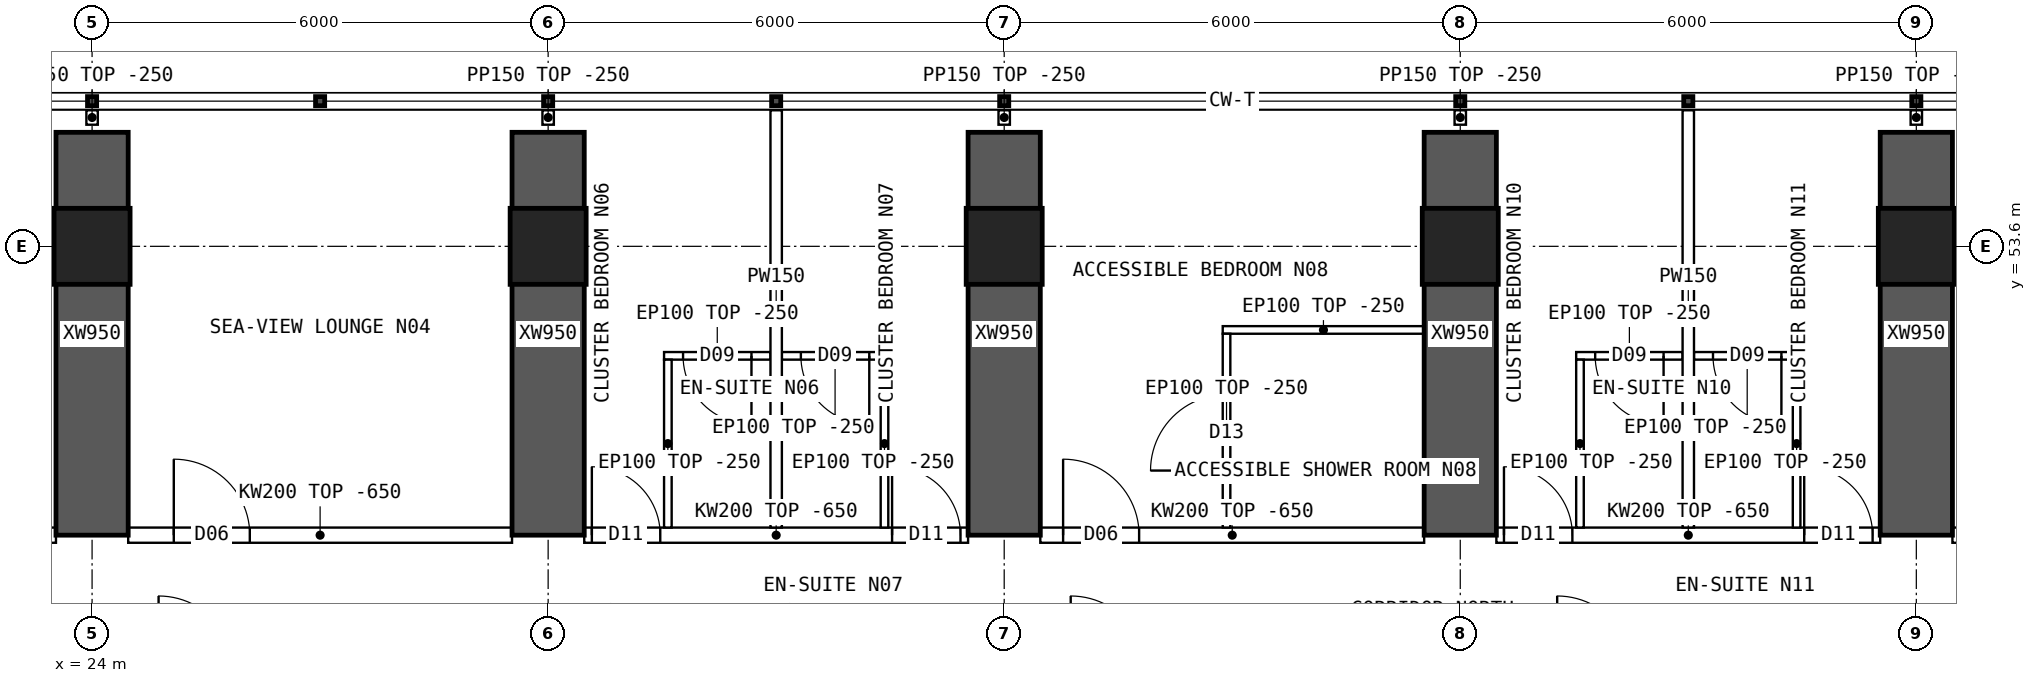
"""IFC4 building model, lengths in metres.
Left out: names, types, materials, properties, quantities, classifications, styles, units other than length and angle.
Written with IfcOpenShell. Run it as: python <this file> out.ifc"""

import sys

from ifc_helpers import new_model, si_unit, direction, frame, frame_2d, origin, origin_2d, place, context, subcontext, project, spatial, polyline, rectangle, hollow_rectangle, outline, extrude, element, fill, save


model = new_model("IFC4")
c1 = context("Model", 3, precision=1e-05, world=origin(), true_north=direction((0.0, 1.0)))
c2 = subcontext(c1, "Body", "Model", "MODEL_VIEW")
j1 = project(units=[si_unit("LENGTHUNIT", "METRE"), si_unit("PLANEANGLEUNIT", "RADIAN")], contexts=[c1])
p1 = place(None, origin())
s1 = spatial("IfcSite", under=j1, at=p1, CompositionType="ELEMENT")
p2 = place(p1, origin())
s2 = spatial("IfcBuilding", under=s1, at=p2, CompositionType="ELEMENT")
p3 = place(p2, frame((0.0, 0.0, 91.9)))
s3 = spatial("IfcBuildingStorey", under=s2, at=p3, CompositionType="ELEMENT", Elevation=91.9)
for number, where, z_axis, x_axis in (
    (1, (24.0, 53.6, 0.0), (0.0, 0.0, 1.0), (1.0, 0.0, 0.0)),
    (2, (30.0, 53.6, 0.0), (0.0, 0.0, 1.0), (1.0, 0.0, 0.0)),
    (3, (36.0, 53.6, 0.0), (0.0, 0.0, 1.0), (1.0, 0.0, 0.0)),
    (4, (42.0, 53.6, 0.0), (0.0, 0.0, 1.0), (1.0, 0.0, 0.0)),
    (5, (48.0, 53.6, 0.0), (0.0, 0.0, 1.0), (1.0, 0.0, 0.0)),
):
    element("IfcColumn", number, at=place(p3, frame(where, z_axis=z_axis, x_axis=x_axis)), inside=s3, PredefinedType="COLUMN", context=c2, shape_type="SweptSolid", body=[
        extrude(hollow_rectangle(XDim=1.0, YDim=1.0, WallThickness=0.1, at=origin_2d()), origin(), (0.0, 0.0, 1.0), 3.75),
    ])
for number, where, z_axis, x_axis in (
    (6, (24.0, 49.8, 0.0), (0.0, 0.0, 1.0), (0.0, 1.0, 0.0)),
    (7, (30.0, 49.8, 0.0), (0.0, 0.0, 1.0), (0.0, 1.0, 0.0)),
    (8, (36.0, 49.8, 0.0), (0.0, 0.0, 1.0), (0.0, 1.0, 0.0)),
    (9, (42.0, 49.8, 0.0), (0.0, 0.0, 1.0), (0.0, 1.0, 0.0)),
    (10, (48.0, 49.8, 0.0), (0.0, 0.0, 1.0), (0.0, 1.0, 0.0)),
):
    element("IfcWall", number, at=place(p3, frame(where, z_axis=z_axis, x_axis=x_axis)), inside=s3, PredefinedType="SHEAR", context=c2, shape_type="SweptSolid", body=[
        extrude(rectangle(XDim=5.3, YDim=0.95, at=frame_2d((2.65, 0.0))), origin(), (0.0, 0.0, 1.0), 3.75),
    ])
p4 = place(p3, frame((18.475, 49.8, 0.0), z_axis=(0.0, 0.0, 1.0), x_axis=(1.0, 0.0, 0.0)))
e11 = element("IfcWall", 11, at=p4, inside=s3, PredefinedType="SOLIDWALL", context=c2, shape_type="SweptSolid", body=[
    extrude(outline(polyline([(0.0, 0.0), (5.05, 0.0), (5.05, 3.1), (0.0, 3.1), (0.0, 0.0)])), frame((0.0, 0.1, 0.0), z_axis=(0.0, -1.0, 0.0), x_axis=(1.0, 0.0, 0.0)), (0.0, 0.0, 1.0), 0.2),
])
p5 = place(p4, frame((0.1, 0.0, 0.0)))
e12 = element("IfcOpeningElement", 12, at=p5, cuts=e11, PredefinedType="OPENING", context=c2, shape_type="SweptSolid", body=[
    extrude(rectangle(XDim=0.9, YDim=2.1, at=frame_2d((0.45, 1.05))), frame((0.0, 0.11, 0.0), z_axis=(0.0, -1.0, 0.0), x_axis=(1.0, 0.0, 0.0)), (0.0, 0.0, 1.0), 0.22),
])
p6 = place(p4, frame((4.05, 0.0, 0.0)))
e13 = element("IfcOpeningElement", 13, at=p6, cuts=e11, PredefinedType="OPENING", context=c2, shape_type="SweptSolid", body=[
    extrude(rectangle(XDim=0.9, YDim=2.1, at=frame_2d((0.45, 1.05))), frame((0.0, 0.11, 0.0), z_axis=(0.0, -1.0, 0.0), x_axis=(1.0, 0.0, 0.0)), (0.0, 0.0, 1.0), 0.22),
])
p7 = place(p3, frame((24.475, 49.8, 0.0), z_axis=(0.0, 0.0, 1.0), x_axis=(1.0, 0.0, 0.0)))
e14 = element("IfcWall", 14, at=p7, inside=s3, PredefinedType="SOLIDWALL", context=c2, shape_type="SweptSolid", body=[
    extrude(outline(polyline([(0.0, 0.0), (5.05, 0.0), (5.05, 3.1), (0.0, 3.1), (0.0, 0.0)])), frame((0.0, 0.1, 0.0), z_axis=(0.0, -1.0, 0.0), x_axis=(1.0, 0.0, 0.0)), (0.0, 0.0, 1.0), 0.2),
])
p8 = place(p7, frame((0.6, 0.0, 0.0)))
e15 = element("IfcOpeningElement", 15, at=p8, cuts=e14, PredefinedType="OPENING", context=c2, shape_type="SweptSolid", body=[
    extrude(rectangle(XDim=1.0, YDim=2.1, at=frame_2d((0.5, 1.05))), frame((0.0, 0.11, 0.0), z_axis=(0.0, -1.0, 0.0), x_axis=(1.0, 0.0, 0.0)), (0.0, 0.0, 1.0), 0.22),
])
p9 = place(p3, frame((30.475, 49.8, 0.0), z_axis=(0.0, 0.0, 1.0), x_axis=(1.0, 0.0, 0.0)))
e16 = element("IfcWall", 16, at=p9, inside=s3, PredefinedType="SOLIDWALL", context=c2, shape_type="SweptSolid", body=[
    extrude(outline(polyline([(0.0, 0.0), (5.05, 0.0), (5.05, 3.1), (0.0, 3.1), (0.0, 0.0)])), frame((0.0, 0.1, 0.0), z_axis=(0.0, -1.0, 0.0), x_axis=(1.0, 0.0, 0.0)), (0.0, 0.0, 1.0), 0.2),
])
p10 = place(p9, frame((0.1, 0.0, 0.0)))
e17 = element("IfcOpeningElement", 17, at=p10, cuts=e16, PredefinedType="OPENING", context=c2, shape_type="SweptSolid", body=[
    extrude(rectangle(XDim=0.9, YDim=2.1, at=frame_2d((0.45, 1.05))), frame((0.0, 0.11, 0.0), z_axis=(0.0, -1.0, 0.0), x_axis=(1.0, 0.0, 0.0)), (0.0, 0.0, 1.0), 0.22),
])
p11 = place(p9, frame((4.05, 0.0, 0.0)))
e18 = element("IfcOpeningElement", 18, at=p11, cuts=e16, PredefinedType="OPENING", context=c2, shape_type="SweptSolid", body=[
    extrude(rectangle(XDim=0.9, YDim=2.1, at=frame_2d((0.45, 1.05))), frame((0.0, 0.11, 0.0), z_axis=(0.0, -1.0, 0.0), x_axis=(1.0, 0.0, 0.0)), (0.0, 0.0, 1.0), 0.22),
])
p12 = place(p3, frame((36.475, 49.8, 0.0), z_axis=(0.0, 0.0, 1.0), x_axis=(1.0, 0.0, 0.0)))
e19 = element("IfcWall", 19, at=p12, inside=s3, PredefinedType="SOLIDWALL", context=c2, shape_type="SweptSolid", body=[
    extrude(outline(polyline([(0.0, 0.0), (5.05, 0.0), (5.05, 3.1), (0.0, 3.1), (0.0, 0.0)])), frame((0.0, 0.1, 0.0), z_axis=(0.0, -1.0, 0.0), x_axis=(1.0, 0.0, 0.0)), (0.0, 0.0, 1.0), 0.2),
])
p13 = place(p12, frame((0.3, 0.0, 0.0)))
e20 = element("IfcOpeningElement", 20, at=p13, cuts=e19, PredefinedType="OPENING", context=c2, shape_type="SweptSolid", body=[
    extrude(rectangle(XDim=1.0, YDim=2.1, at=frame_2d((0.5, 1.05))), frame((0.0, 0.11, 0.0), z_axis=(0.0, -1.0, 0.0), x_axis=(1.0, 0.0, 0.0)), (0.0, 0.0, 1.0), 0.22),
])
p14 = place(p3, frame((42.475, 49.8, 0.0), z_axis=(0.0, 0.0, 1.0), x_axis=(1.0, 0.0, 0.0)))
e21 = element("IfcWall", 21, at=p14, inside=s3, PredefinedType="SOLIDWALL", context=c2, shape_type="SweptSolid", body=[
    extrude(outline(polyline([(0.0, 0.0), (5.05, 0.0), (5.05, 3.1), (0.0, 3.1), (0.0, 0.0)])), frame((0.0, 0.1, 0.0), z_axis=(0.0, -1.0, 0.0), x_axis=(1.0, 0.0, 0.0)), (0.0, 0.0, 1.0), 0.2),
])
p15 = place(p14, frame((0.1, 0.0, 0.0)))
e22 = element("IfcOpeningElement", 22, at=p15, cuts=e21, PredefinedType="OPENING", context=c2, shape_type="SweptSolid", body=[
    extrude(rectangle(XDim=0.9, YDim=2.1, at=frame_2d((0.45, 1.05))), frame((0.0, 0.11, 0.0), z_axis=(0.0, -1.0, 0.0), x_axis=(1.0, 0.0, 0.0)), (0.0, 0.0, 1.0), 0.22),
])
p16 = place(p14, frame((4.05, 0.0, 0.0)))
e23 = element("IfcOpeningElement", 23, at=p16, cuts=e21, PredefinedType="OPENING", context=c2, shape_type="SweptSolid", body=[
    extrude(rectangle(XDim=0.9, YDim=2.1, at=frame_2d((0.45, 1.05))), frame((0.0, 0.11, 0.0), z_axis=(0.0, -1.0, 0.0), x_axis=(1.0, 0.0, 0.0)), (0.0, 0.0, 1.0), 0.22),
])
p17 = place(p3, frame((48.475, 49.8, 0.0), z_axis=(0.0, 0.0, 1.0), x_axis=(1.0, 0.0, 0.0)))
e24 = element("IfcWall", 24, at=p17, inside=s3, PredefinedType="SOLIDWALL", context=c2, shape_type="SweptSolid", body=[
    extrude(outline(polyline([(0.0, 0.0), (5.05, 0.0), (5.05, 3.1), (0.0, 3.1), (0.0, 0.0)])), frame((0.0, 0.1, 0.0), z_axis=(0.0, -1.0, 0.0), x_axis=(1.0, 0.0, 0.0)), (0.0, 0.0, 1.0), 0.2),
])
p18 = place(p17, frame((0.6, 0.0, 0.0)))
e25 = element("IfcOpeningElement", 25, at=p18, cuts=e24, PredefinedType="OPENING", context=c2, shape_type="SweptSolid", body=[
    extrude(rectangle(XDim=1.0, YDim=2.1, at=frame_2d((0.5, 1.05))), frame((0.0, 0.11, 0.0), z_axis=(0.0, -1.0, 0.0), x_axis=(1.0, 0.0, 0.0)), (0.0, 0.0, 1.0), 0.22),
])
p19 = place(p3, frame((33.0, 55.39, 0.0), z_axis=(0.0, 0.0, 1.0), x_axis=(0.0, -1.0, 0.0)))
e26 = element("IfcWall", 26, at=p19, inside=s3, PredefinedType="PARTITIONING", context=c2, shape_type="SweptSolid", body=[
    extrude(outline(polyline([(0.0, 0.0), (5.49, 0.0), (5.49, 3.1), (5.442, 3.1), (5.44, 3.5), (1.992, 3.5), (1.99, 3.1), (1.592, 3.1), (1.59, 3.5), (0.0, 3.5), (0.0, 0.0)])), frame((0.0, 0.075, 0.0), z_axis=(0.0, -1.0, 0.0), x_axis=(1.0, 0.0, 0.0)), (0.0, 0.0, 1.0), 0.15),
])
p20 = place(p3, frame((31.525, 52.159, 0.0), z_axis=(0.0, 0.0, 1.0), x_axis=(1.0, 0.0, 0.0)))
e27 = element("IfcWall", 27, at=p20, inside=s3, PredefinedType="PARTITIONING", context=c2, shape_type="SweptSolid", body=[
    extrude(rectangle(XDim=1.4, YDim=0.1, at=frame_2d((0.7, 0.0))), origin(), (0.0, 0.0, 1.0), 3.5),
])
p21 = place(p20, frame((0.25, 0.0, 0.0)))
e28 = element("IfcOpeningElement", 28, at=p21, cuts=e27, PredefinedType="OPENING", context=c2, shape_type="SweptSolid", body=[
    extrude(rectangle(XDim=0.9, YDim=2.1, at=frame_2d((0.45, 1.05))), frame((0.0, 0.06, 0.0), z_axis=(0.0, -1.0, 0.0), x_axis=(1.0, 0.0, 0.0)), (0.0, 0.0, 1.0), 0.12),
])
p22 = place(p3, frame((31.575, 52.109, 0.0), z_axis=(0.0, 0.0, 1.0), x_axis=(0.0, -1.0, 0.0)))
e29 = element("IfcWall", 29, at=p22, inside=s3, PredefinedType="PARTITIONING", context=c2, shape_type="SweptSolid", body=[
    extrude(outline(polyline([(0.0, 0.0), (2.209, 0.0), (2.209, 3.1), (2.161, 3.1), (2.159, 3.5), (0.0, 3.5), (0.0, 0.0)])), frame((0.0, 0.05, 0.0), z_axis=(0.0, -1.0, 0.0), x_axis=(1.0, 0.0, 0.0)), (0.0, 0.0, 1.0), 0.1),
])
p23 = place(p3, frame((33.075, 52.159, 0.0), z_axis=(0.0, 0.0, 1.0), x_axis=(1.0, 0.0, 0.0)))
e30 = element("IfcWall", 30, at=p23, inside=s3, PredefinedType="PARTITIONING", context=c2, shape_type="SweptSolid", body=[
    extrude(rectangle(XDim=1.4, YDim=0.1, at=frame_2d((0.7, 0.0))), origin(), (0.0, 0.0, 1.0), 3.5),
])
p24 = place(p23, frame((0.25, 0.0, 0.0)))
e31 = element("IfcOpeningElement", 31, at=p24, cuts=e30, PredefinedType="OPENING", context=c2, shape_type="SweptSolid", body=[
    extrude(rectangle(XDim=0.9, YDim=2.1, at=frame_2d((0.45, 1.05))), frame((0.0, 0.06, 0.0), z_axis=(0.0, -1.0, 0.0), x_axis=(1.0, 0.0, 0.0)), (0.0, 0.0, 1.0), 0.12),
])
p25 = place(p3, frame((34.425, 52.109, 0.0), z_axis=(0.0, 0.0, 1.0), x_axis=(0.0, -1.0, 0.0)))
e32 = element("IfcWall", 32, at=p25, inside=s3, PredefinedType="PARTITIONING", context=c2, shape_type="SweptSolid", body=[
    extrude(outline(polyline([(0.0, 0.0), (2.209, 0.0), (2.209, 3.1), (2.161, 3.1), (2.159, 3.5), (0.0, 3.5), (0.0, 0.0)])), frame((0.0, 0.05, 0.0), z_axis=(0.0, -1.0, 0.0), x_axis=(1.0, 0.0, 0.0)), (0.0, 0.0, 1.0), 0.1),
])
p26 = place(p3, frame((38.875, 52.5, 0.0), z_axis=(0.0, 0.0, 1.0), x_axis=(1.0, 0.0, 0.0)))
e33 = element("IfcWall", 33, at=p26, inside=s3, PredefinedType="PARTITIONING", context=c2, shape_type="SweptSolid", body=[
    extrude(rectangle(XDim=2.65, YDim=0.1, at=frame_2d((1.325, 0.0))), origin(), (0.0, 0.0, 1.0), 3.5),
])
p27 = place(p3, frame((38.925, 52.45, 0.0), z_axis=(0.0, 0.0, 1.0), x_axis=(0.0, -1.0, 0.0)))
e34 = element("IfcWall", 34, at=p27, inside=s3, PredefinedType="PARTITIONING", context=c2, shape_type="SweptSolid", body=[
    extrude(outline(polyline([(0.0, 0.0), (2.55, 0.0), (2.55, 3.1), (2.502, 3.1), (2.5, 3.5), (0.0, 3.5), (0.0, 0.0)])), frame((0.0, 0.05, 0.0), z_axis=(0.0, -1.0, 0.0), x_axis=(1.0, 0.0, 0.0)), (0.0, 0.0, 1.0), 0.1),
])
p28 = place(p27, frame((0.8, 0.0, 0.0)))
e35 = element("IfcOpeningElement", 35, at=p28, cuts=e34, PredefinedType="OPENING", context=c2, shape_type="SweptSolid", body=[
    extrude(rectangle(XDim=1.0, YDim=2.1, at=frame_2d((0.5, 1.05))), frame((0.0, 0.06, 0.0), z_axis=(0.0, -1.0, 0.0), x_axis=(1.0, 0.0, 0.0)), (0.0, 0.0, 1.0), 0.12),
])
p29 = place(p3, frame((45.0, 55.39, 0.0), z_axis=(0.0, 0.0, 1.0), x_axis=(0.0, -1.0, 0.0)))
e36 = element("IfcWall", 36, at=p29, inside=s3, PredefinedType="PARTITIONING", context=c2, shape_type="SweptSolid", body=[
    extrude(outline(polyline([(0.0, 0.0), (5.49, 0.0), (5.49, 3.1), (5.442, 3.1), (5.44, 3.5), (1.992, 3.5), (1.99, 3.1), (1.592, 3.1), (1.59, 3.5), (0.0, 3.5), (0.0, 0.0)])), frame((0.0, 0.075, 0.0), z_axis=(0.0, -1.0, 0.0), x_axis=(1.0, 0.0, 0.0)), (0.0, 0.0, 1.0), 0.15),
])
p30 = place(p3, frame((43.525, 52.159, 0.0), z_axis=(0.0, 0.0, 1.0), x_axis=(1.0, 0.0, 0.0)))
e37 = element("IfcWall", 37, at=p30, inside=s3, PredefinedType="PARTITIONING", context=c2, shape_type="SweptSolid", body=[
    extrude(rectangle(XDim=1.4, YDim=0.1, at=frame_2d((0.7, 0.0))), origin(), (0.0, 0.0, 1.0), 3.5),
])
p31 = place(p30, frame((0.25, 0.0, 0.0)))
e38 = element("IfcOpeningElement", 38, at=p31, cuts=e37, PredefinedType="OPENING", context=c2, shape_type="SweptSolid", body=[
    extrude(rectangle(XDim=0.9, YDim=2.1, at=frame_2d((0.45, 1.05))), frame((0.0, 0.06, 0.0), z_axis=(0.0, -1.0, 0.0), x_axis=(1.0, 0.0, 0.0)), (0.0, 0.0, 1.0), 0.12),
])
p32 = place(p3, frame((43.575, 52.109, 0.0), z_axis=(0.0, 0.0, 1.0), x_axis=(0.0, -1.0, 0.0)))
e39 = element("IfcWall", 39, at=p32, inside=s3, PredefinedType="PARTITIONING", context=c2, shape_type="SweptSolid", body=[
    extrude(outline(polyline([(0.0, 0.0), (2.209, 0.0), (2.209, 3.1), (2.161, 3.1), (2.159, 3.5), (0.0, 3.5), (0.0, 0.0)])), frame((0.0, 0.05, 0.0), z_axis=(0.0, -1.0, 0.0), x_axis=(1.0, 0.0, 0.0)), (0.0, 0.0, 1.0), 0.1),
])
p33 = place(p3, frame((45.075, 52.159, 0.0), z_axis=(0.0, 0.0, 1.0), x_axis=(1.0, 0.0, 0.0)))
e40 = element("IfcWall", 40, at=p33, inside=s3, PredefinedType="PARTITIONING", context=c2, shape_type="SweptSolid", body=[
    extrude(rectangle(XDim=1.4, YDim=0.1, at=frame_2d((0.7, 0.0))), origin(), (0.0, 0.0, 1.0), 3.5),
])
p34 = place(p33, frame((0.25, 0.0, 0.0)))
e41 = element("IfcOpeningElement", 41, at=p34, cuts=e40, PredefinedType="OPENING", context=c2, shape_type="SweptSolid", body=[
    extrude(rectangle(XDim=0.9, YDim=2.1, at=frame_2d((0.45, 1.05))), frame((0.0, 0.06, 0.0), z_axis=(0.0, -1.0, 0.0), x_axis=(1.0, 0.0, 0.0)), (0.0, 0.0, 1.0), 0.12),
])
p35 = place(p3, frame((46.425, 52.109, 0.0), z_axis=(0.0, 0.0, 1.0), x_axis=(0.0, -1.0, 0.0)))
e42 = element("IfcWall", 42, at=p35, inside=s3, PredefinedType="PARTITIONING", context=c2, shape_type="SweptSolid", body=[
    extrude(outline(polyline([(0.0, 0.0), (2.209, 0.0), (2.209, 3.1), (2.161, 3.1), (2.159, 3.5), (0.0, 3.5), (0.0, 0.0)])), frame((0.0, 0.05, 0.0), z_axis=(0.0, -1.0, 0.0), x_axis=(1.0, 0.0, 0.0)), (0.0, 0.0, 1.0), 0.1),
])
for number, where, z_axis, x_axis in (
    (43, (24.0, 55.2, 0.0), (0.0, 0.0, 1.0), (0.0, 1.0, 0.0)),
    (44, (30.0, 55.2, 0.0), (0.0, 0.0, 1.0), (0.0, 1.0, 0.0)),
    (45, (36.0, 55.2, 0.0), (0.0, 0.0, 1.0), (0.0, 1.0, 0.0)),
    (46, (42.0, 55.2, 0.0), (0.0, 0.0, 1.0), (0.0, 1.0, 0.0)),
    (47, (48.0, 55.2, 0.0), (0.0, 0.0, 1.0), (0.0, 1.0, 0.0)),
):
    element("IfcWall", number, at=place(p3, frame(where, z_axis=z_axis, x_axis=x_axis)), inside=s3, PredefinedType="PARTITIONING", context=c2, shape_type="SweptSolid", body=[
        extrude(rectangle(XDim=0.19, YDim=0.15, at=frame_2d((0.095, 0.0))), origin(), (0.0, 0.0, 1.0), 3.5),
    ])
p36 = place(p8, origin())
e48 = element("IfcDoor", 48, at=p36, inside=s3, OperationType="SINGLE_SWING_LEFT", PredefinedType="DOOR", context=c2, shape_type="SweptSolid", body=[
    extrude(rectangle(XDim=1.0, YDim=2.1, at=frame_2d((0.5, 1.05))), frame((0.0, 0.025, 0.0), z_axis=(0.0, -1.0, 0.0), x_axis=(1.0, 0.0, 0.0)), (0.0, 0.0, 1.0), 0.05),
])
fill(e15, e48)
p37 = place(p21, origin())
e49 = element("IfcDoor", 49, at=p37, inside=s3, OperationType="SINGLE_SWING_RIGHT", PredefinedType="DOOR", context=c2, shape_type="SweptSolid", body=[
    extrude(rectangle(XDim=0.9, YDim=2.1, at=frame_2d((0.45, 1.05))), frame((0.0, 0.025, 0.0), z_axis=(0.0, -1.0, 0.0), x_axis=(1.0, 0.0, 0.0)), (0.0, 0.0, 1.0), 0.05),
])
fill(e28, e49)
p38 = place(p10, origin())
e50 = element("IfcDoor", 50, at=p38, inside=s3, OperationType="SINGLE_SWING_LEFT", PredefinedType="DOOR", context=c2, shape_type="SweptSolid", body=[
    extrude(rectangle(XDim=0.9, YDim=2.1, at=frame_2d((0.45, 1.05))), frame((0.0, 0.025, 0.0), z_axis=(0.0, -1.0, 0.0), x_axis=(1.0, 0.0, 0.0)), (0.0, 0.0, 1.0), 0.05),
])
fill(e17, e50)
p39 = place(p24, origin())
e51 = element("IfcDoor", 51, at=p39, inside=s3, OperationType="SINGLE_SWING_RIGHT", PredefinedType="DOOR", context=c2, shape_type="SweptSolid", body=[
    extrude(rectangle(XDim=0.9, YDim=2.1, at=frame_2d((0.45, 1.05))), frame((0.0, 0.025, 0.0), z_axis=(0.0, -1.0, 0.0), x_axis=(1.0, 0.0, 0.0)), (0.0, 0.0, 1.0), 0.05),
])
fill(e31, e51)
p40 = place(p11, origin())
e52 = element("IfcDoor", 52, at=p40, inside=s3, OperationType="SINGLE_SWING_LEFT", PredefinedType="DOOR", context=c2, shape_type="SweptSolid", body=[
    extrude(rectangle(XDim=0.9, YDim=2.1, at=frame_2d((0.45, 1.05))), frame((0.0, 0.025, 0.0), z_axis=(0.0, -1.0, 0.0), x_axis=(1.0, 0.0, 0.0)), (0.0, 0.0, 1.0), 0.05),
])
fill(e18, e52)
p41 = place(p28, origin())
e53 = element("IfcDoor", 53, at=p41, inside=s3, OperationType="SINGLE_SWING_RIGHT", PredefinedType="DOOR", context=c2, shape_type="SweptSolid", body=[
    extrude(rectangle(XDim=1.0, YDim=2.1, at=frame_2d((0.5, 1.05))), frame((0.0, 0.025, 0.0), z_axis=(0.0, -1.0, 0.0), x_axis=(1.0, 0.0, 0.0)), (0.0, 0.0, 1.0), 0.05),
])
fill(e35, e53)
p42 = place(p13, origin())
e54 = element("IfcDoor", 54, at=p42, inside=s3, OperationType="SINGLE_SWING_LEFT", PredefinedType="DOOR", context=c2, shape_type="SweptSolid", body=[
    extrude(rectangle(XDim=1.0, YDim=2.1, at=frame_2d((0.5, 1.05))), frame((0.0, 0.025, 0.0), z_axis=(0.0, -1.0, 0.0), x_axis=(1.0, 0.0, 0.0)), (0.0, 0.0, 1.0), 0.05),
])
fill(e20, e54)
p43 = place(p31, origin())
e55 = element("IfcDoor", 55, at=p43, inside=s3, OperationType="SINGLE_SWING_RIGHT", PredefinedType="DOOR", context=c2, shape_type="SweptSolid", body=[
    extrude(rectangle(XDim=0.9, YDim=2.1, at=frame_2d((0.45, 1.05))), frame((0.0, 0.025, 0.0), z_axis=(0.0, -1.0, 0.0), x_axis=(1.0, 0.0, 0.0)), (0.0, 0.0, 1.0), 0.05),
])
fill(e38, e55)
p44 = place(p15, origin())
e56 = element("IfcDoor", 56, at=p44, inside=s3, OperationType="SINGLE_SWING_LEFT", PredefinedType="DOOR", context=c2, shape_type="SweptSolid", body=[
    extrude(rectangle(XDim=0.9, YDim=2.1, at=frame_2d((0.45, 1.05))), frame((0.0, 0.025, 0.0), z_axis=(0.0, -1.0, 0.0), x_axis=(1.0, 0.0, 0.0)), (0.0, 0.0, 1.0), 0.05),
])
fill(e22, e56)
p45 = place(p34, origin())
e57 = element("IfcDoor", 57, at=p45, inside=s3, OperationType="SINGLE_SWING_RIGHT", PredefinedType="DOOR", context=c2, shape_type="SweptSolid", body=[
    extrude(rectangle(XDim=0.9, YDim=2.1, at=frame_2d((0.45, 1.05))), frame((0.0, 0.025, 0.0), z_axis=(0.0, -1.0, 0.0), x_axis=(1.0, 0.0, 0.0)), (0.0, 0.0, 1.0), 0.05),
])
fill(e41, e57)
p46 = place(p16, origin())
e58 = element("IfcDoor", 58, at=p46, inside=s3, OperationType="SINGLE_SWING_LEFT", PredefinedType="DOOR", context=c2, shape_type="SweptSolid", body=[
    extrude(rectangle(XDim=0.9, YDim=2.1, at=frame_2d((0.45, 1.05))), frame((0.0, 0.025, 0.0), z_axis=(0.0, -1.0, 0.0), x_axis=(1.0, 0.0, 0.0)), (0.0, 0.0, 1.0), 0.05),
])
fill(e23, e58)
save(model, sys.argv[1])
